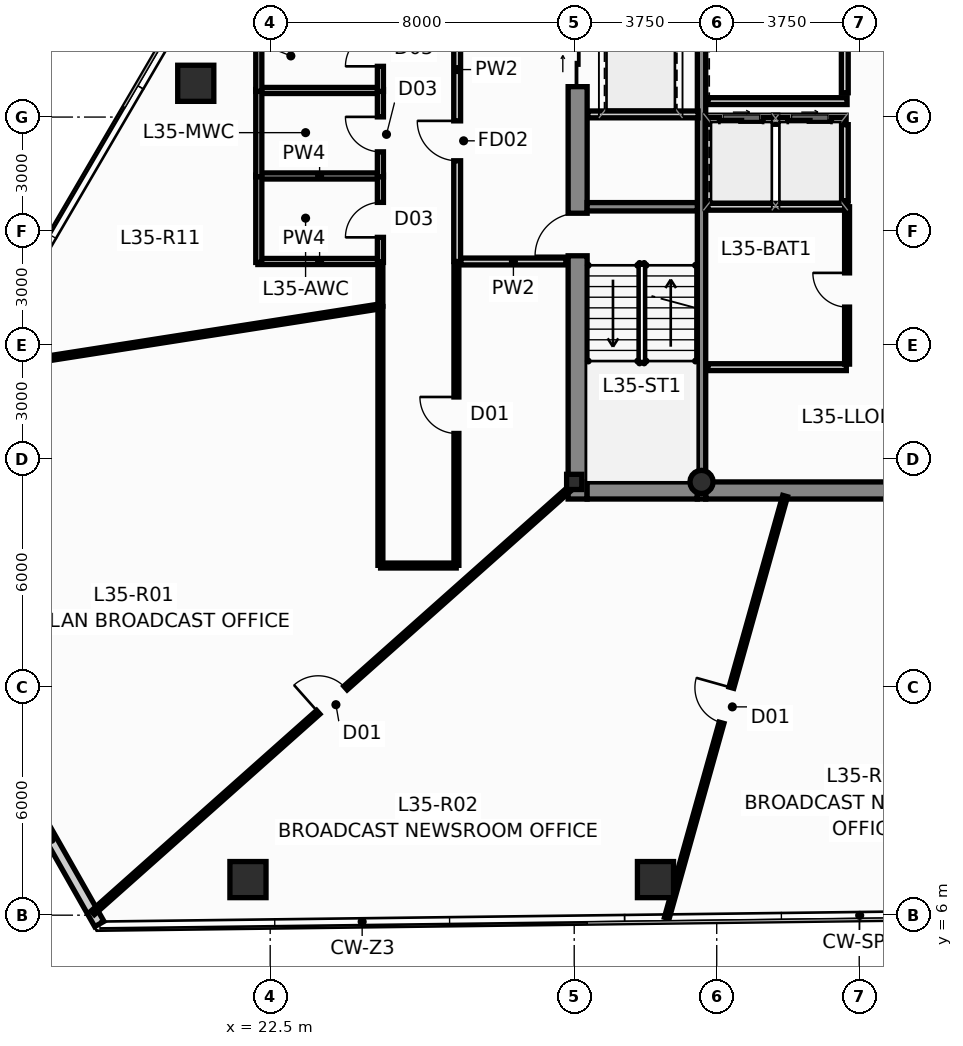
"""IFC4 building model, lengths in metres.
Left out: names, types, materials, properties, quantities, classifications, styles, units other than length and angle.
Written with IfcOpenShell. Run it as: python <this file> out.ifc"""

import sys

from ifc_helpers import new_model, si_unit, direction, frame, frame_2d, origin, origin_2d, place, context, subcontext, project, spatial, rectangle, hollow_rectangle, hollow_circle, i_section, extrude, source, transform, mapped, element, fill, save


model = new_model("IFC4")
c1 = context("Model", 3, precision=1e-05, world=origin(), true_north=direction((0.0, 1.0)))
c2 = subcontext(c1, "Body", "Model", "MODEL_VIEW")
j1 = project(units=[si_unit("LENGTHUNIT", "METRE"), si_unit("PLANEANGLEUNIT", "RADIAN")], contexts=[c1])
p1 = place(None, origin())
s1 = spatial("IfcSite", under=j1, at=p1, CompositionType="ELEMENT")
p2 = place(p1, origin())
s2 = spatial("IfcBuilding", under=s1, at=p2, CompositionType="ELEMENT")
p3 = place(p2, frame((0.0, 0.0, 135.45)))
s3 = spatial("IfcBuildingStorey", under=s2, at=p3, CompositionType="ELEMENT", Elevation=135.45)
m1 = source(origin(), c2, "Body", "SweptSolid", [
    extrude(i_section(OverallWidth=0.4, OverallDepth=0.4, WebThickness=0.02, FlangeThickness=0.032, at=origin_2d()), origin(), (0.0, 0.0, 1.0), 3.65),
])
p4 = place(p3, frame((30.5, 17.4, 0.0), z_axis=(0.0, 0.0, 1.0), x_axis=(1.0, 0.0, 0.0)))
e1 = element("IfcColumn", 1, at=p4, inside=s3, PredefinedType="COLUMN", context=c2, shape_type="MappedRepresentation", body=[
    mapped(m1, transform((0.0, 0.0, 0.0), scale=1.0)),
])
m2 = source(origin(), c2, "Body", "SweptSolid", [
    extrude(hollow_circle(Radius=0.305, WallThickness=0.025, at=origin_2d()), origin(), (0.0, 0.0, 1.0), 3.65),
])
p5 = place(p3, frame((33.85, 17.4, 0.0), z_axis=(0.0, 0.0, 1.0), x_axis=(1.0, 0.0, 0.0)))
e2 = element("IfcColumn", 2, at=p5, inside=s3, PredefinedType="COLUMN", context=c2, shape_type="MappedRepresentation", body=[
    mapped(m2, transform((0.0, 0.0, 0.0), scale=1.0)),
])
p6 = place(p3, frame((30.59, 16.95, 0.0), z_axis=(0.0, 0.0, 1.0), x_axis=(0.0, 1.0, 0.0)))
e3 = element("IfcWall", 3, at=p6, inside=s3, PredefinedType="SHEAR", context=c2, shape_type="SweptSolid", body=[
    extrude(rectangle(XDim=13.275, YDim=0.5, at=frame_2d((6.638, 0.0))), origin(), (0.0, 0.0, 1.0), 3.65),
])
p7 = place(p6, frame((6.4, 0.0, 0.0)))
e4 = element("IfcOpeningElement", 4, at=p7, cuts=e3, PredefinedType="OPENING", context=c2, shape_type="SweptSolid", body=[
    extrude(rectangle(XDim=1.12, YDim=2.15, at=frame_2d((0.56, 1.075))), frame((0.0, 0.262, 0.0), z_axis=(0.0, -1.0, 0.0), x_axis=(1.0, 0.0, 0.0)), (0.0, 0.0, 1.0), 0.524),
])
p8 = place(p6, frame((10.85, 0.0, 0.0)))
e5 = element("IfcOpeningElement", 5, at=p8, cuts=e3, PredefinedType="OPENING", context=c2, shape_type="SweptSolid", body=[
    extrude(rectangle(XDim=1.2, YDim=2.2, at=frame_2d((0.6, 1.1))), frame((0.0, 0.262, 0.0), z_axis=(0.0, -1.0, 0.0), x_axis=(1.0, 0.0, 0.0)), (0.0, 0.0, 1.0), 0.524),
])
p9 = place(p3, frame((30.84, 17.175, 0.0), z_axis=(0.0, 0.0, 1.0), x_axis=(1.0, 0.0, 0.0)))
e6 = element("IfcWall", 6, at=p9, inside=s3, PredefinedType="SHEAR", context=c2, shape_type="SweptSolid", body=[
    extrude(rectangle(XDim=2.9, YDim=0.45, at=frame_2d((1.45, 0.0))), origin(), (0.0, 0.0, 1.0), 3.65),
])
p10 = place(p3, frame((33.96, 17.175, 0.0), z_axis=(0.0, 0.0, 1.0), x_axis=(1.0, 0.0, 0.0)))
e7 = element("IfcWall", 7, at=p10, inside=s3, PredefinedType="SHEAR", context=c2, shape_type="SweptSolid", body=[
    extrude(rectangle(XDim=8.08, YDim=0.45, at=frame_2d((4.04, 0.0))), origin(), (0.0, 0.0, 1.0), 3.65),
])
p11 = place(p3, frame((33.85, 16.95, 0.0), z_axis=(0.0, 0.0, 1.0), x_axis=(0.0, 1.0, 0.0)))
e8 = element("IfcWall", 8, at=p11, inside=s3, PredefinedType="SHEAR", context=c2, shape_type="SweptSolid", body=[
    extrude(rectangle(XDim=13.275, YDim=0.22, at=frame_2d((6.638, 0.0))), origin(), (0.0, 0.0, 1.0), 3.65),
])
p12 = place(p3, frame((30.84, 24.64, 0.0), z_axis=(0.0, 0.0, 1.0), x_axis=(1.0, 0.0, 0.0)))
e9 = element("IfcWall", 9, at=p12, inside=s3, PredefinedType="SHEAR", context=c2, shape_type="SweptSolid", body=[
    extrude(rectangle(XDim=2.9, YDim=0.22, at=frame_2d((1.45, 0.0))), origin(), (0.0, 0.0, 1.0), 3.65),
])
m3 = source(origin(), c2, "Body", "SweptSolid", [
    extrude(hollow_rectangle(XDim=0.95, YDim=0.95, WallThickness=0.05, at=origin_2d()), origin(), (0.0, 0.0, 1.0), 3.651),
])
p13 = place(p3, frame((20.542, 27.889, 0.0), z_axis=(0.014912302561, -0.01384236157, 0.999792984702), x_axis=(0.680325028146, 0.732910537568, 0.0)))
e10 = element("IfcColumn", 10, at=p13, inside=s3, PredefinedType="COLUMN", context=c2, shape_type="MappedRepresentation", body=[
    mapped(m3, transform((0.0, 0.0, 0.0), scale=1.0)),
])
m4 = source(origin(), c2, "Body", "SweptSolid", [
    extrude(hollow_rectangle(XDim=0.95, YDim=0.95, WallThickness=0.05, at=origin_2d()), origin(), (0.0, 0.0, 1.0), 3.651),
])
p14 = place(p3, frame((21.915, 6.936, 0.0), z_axis=(-0.013440068782, 0.019792340097, 0.999713772949), x_axis=(-0.827290216258, -0.561774775229, 0.0)))
e11 = element("IfcColumn", 11, at=p14, inside=s3, PredefinedType="COLUMN", context=c2, shape_type="MappedRepresentation", body=[
    mapped(m4, transform((0.0, 0.0, 0.0), scale=1.0)),
])
p15 = place(p3, frame((32.638, 6.936, 0.0), z_axis=(-0.004480382638, 0.019793929266, 0.999794042058), x_axis=(-0.975326687046, -0.220766513622, 0.0)))
e12 = element("IfcColumn", 12, at=p15, inside=s3, PredefinedType="COLUMN", context=c2, shape_type="MappedRepresentation", body=[
    mapped(m3, transform((0.0, 0.0, 0.0), scale=1.0)),
])
p16 = place(p3, frame((18.004, 5.768, 0.0), z_axis=(0.0, 0.0, 1.0), x_axis=(-0.493589358445, 0.869695087505, 0.0)))
e13 = element("IfcWall", 13, at=p16, inside=s3, PredefinedType="STANDARD", context=c2, shape_type="SweptSolid", body=[
    extrude(rectangle(XDim=11.735, YDim=0.28, at=frame_2d((5.867, 0.0))), origin(), (0.0, 0.0, 1.0), 3.4),
])
p17 = place(p16, frame((5.12, 0.0, 0.9)))
e14 = element("IfcOpeningElement", 14, at=p17, cuts=e13, PredefinedType="OPENING", context=c2, shape_type="SweptSolid", body=[
    extrude(rectangle(XDim=1.5, YDim=1.8, at=frame_2d((0.75, 0.9))), frame((0.0, 0.152, 0.0), z_axis=(0.0, -1.0, 0.0), x_axis=(1.0, 0.0, 0.0)), (0.0, 0.0, 1.0), 0.304),
])
p18 = place(p3, frame((34.02, 26.9, 0.0), z_axis=(0.0, 0.0, 1.0), x_axis=(1.0, 0.0, 0.0)))
e15 = element("IfcWall", 15, at=p18, inside=s3, PredefinedType="PARTITIONING", context=c2, shape_type="SweptSolid", body=[
    extrude(rectangle(XDim=3.6, YDim=0.18, at=frame_2d((1.8, 0.0))), origin(), (0.0, 0.0, 1.0), 3.4),
])
p19 = place(p18, frame((0.3, 0.0, 0.0)))
e16 = element("IfcOpeningElement", 16, at=p19, cuts=e15, PredefinedType="OPENING", context=c2, shape_type="SweptSolid", body=[
    extrude(rectangle(XDim=1.15, YDim=2.2, at=frame_2d((0.575, 1.1))), frame((0.0, 0.102, 0.0), z_axis=(0.0, -1.0, 0.0), x_axis=(1.0, 0.0, 0.0)), (0.0, 0.0, 1.0), 0.204),
])
p20 = place(p18, frame((2.1, 0.0, 0.0)))
e17 = element("IfcOpeningElement", 17, at=p20, cuts=e15, PredefinedType="OPENING", context=c2, shape_type="SweptSolid", body=[
    extrude(rectangle(XDim=1.15, YDim=2.2, at=frame_2d((0.575, 1.1))), frame((0.0, 0.102, 0.0), z_axis=(0.0, -1.0, 0.0), x_axis=(1.0, 0.0, 0.0)), (0.0, 0.0, 1.0), 0.204),
])
p21 = place(p3, frame((37.62, 24.8, 0.0), z_axis=(0.0, 0.0, 1.0), x_axis=(0.0, 1.0, 0.0)))
e18 = element("IfcWall", 18, at=p21, inside=s3, PredefinedType="PARTITIONING", context=c2, shape_type="SweptSolid", body=[
    extrude(rectangle(XDim=2.0, YDim=0.18, at=frame_2d((1.0, 0.0))), origin(), (0.0, 0.0, 1.0), 3.4),
])
p22 = place(p3, frame((34.02, 24.64, 0.0), z_axis=(0.0, 0.0, 1.0), x_axis=(1.0, 0.0, 0.0)))
e19 = element("IfcWall", 19, at=p22, inside=s3, PredefinedType="PARTITIONING", context=c2, shape_type="SweptSolid", body=[
    extrude(rectangle(XDim=3.68, YDim=0.18, at=frame_2d((1.84, 0.0))), origin(), (0.0, 0.0, 1.0), 3.4),
])
p23 = place(p3, frame((34.02, 27.42, 0.0), z_axis=(0.0, 0.0, 1.0), x_axis=(1.0, 0.0, 0.0)))
e20 = element("IfcWall", 20, at=p23, inside=s3, PredefinedType="PARTITIONING", context=c2, shape_type="SweptSolid", body=[
    extrude(rectangle(XDim=3.66, YDim=0.18, at=frame_2d((1.83, 0.0))), origin(), (0.0, 0.0, 1.0), 3.4),
])
p24 = place(p3, frame((37.62, 27.64, 0.0), z_axis=(0.0, 0.0, 1.0), x_axis=(0.0, 1.0, 0.0)))
e21 = element("IfcWall", 21, at=p24, inside=s3, PredefinedType="PARTITIONING", context=c2, shape_type="SweptSolid", body=[
    extrude(rectangle(XDim=2.11, YDim=0.18, at=frame_2d((1.055, 0.0))), origin(), (0.0, 0.0, 1.0), 3.4),
])
p25 = place(p3, frame((27.42, 23.2, 0.0), z_axis=(0.0, 0.0, 1.0), x_axis=(0.0, 1.0, 0.0)))
e22 = element("IfcWall", 22, at=p25, inside=s3, PredefinedType="PARTITIONING", context=c2, shape_type="SweptSolid", body=[
    extrude(rectangle(XDim=6.4, YDim=0.18, at=frame_2d((3.2, 0.0))), origin(), (0.0, 0.0, 1.0), 3.078),
])
p26 = place(p25, frame((2.65, 0.0, 0.0)))
e23 = element("IfcOpeningElement", 23, at=p26, cuts=e22, PredefinedType="OPENING", context=c2, shape_type="SweptSolid", body=[
    extrude(rectangle(XDim=1.05, YDim=2.15, at=frame_2d((0.525, 1.075))), frame((0.0, 0.102, 0.0), z_axis=(0.0, -1.0, 0.0), x_axis=(1.0, 0.0, 0.0)), (0.0, 0.0, 1.0), 0.204),
])
p27 = place(p3, frame((27.52, 23.2, 0.0), z_axis=(0.0, 0.0, 1.0), x_axis=(1.0, 0.0, 0.0)))
e24 = element("IfcWall", 24, at=p27, inside=s3, PredefinedType="PARTITIONING", context=c2, shape_type="SweptSolid", body=[
    extrude(rectangle(XDim=2.76, YDim=0.18, at=frame_2d((1.38, 0.0))), origin(), (0.0, 0.0, 1.0), 3.4),
])
p28 = place(p3, frame((30.86, 27.07, 0.0), z_axis=(0.0, 0.0, 1.0), x_axis=(1.0, 0.0, 0.0)))
e25 = element("IfcWall", 25, at=p28, inside=s3, PredefinedType="PARTITIONING", context=c2, shape_type="SweptSolid", body=[
    extrude(rectangle(XDim=2.9, YDim=0.18, at=frame_2d((1.45, 0.0))), origin(), (0.0, 0.0, 1.0), 3.4),
])
p29 = place(p3, frame((34.02, 20.42, 0.0), z_axis=(0.0, 0.0, 1.0), x_axis=(1.0, 0.0, 0.0)))
e26 = element("IfcWall", 26, at=p29, inside=s3, PredefinedType="PARTITIONING", context=c2, shape_type="SweptSolid", body=[
    extrude(rectangle(XDim=3.64, YDim=0.18, at=frame_2d((1.82, 0.0))), origin(), (0.0, 0.0, 1.0), 3.4),
])
p30 = place(p3, frame((37.68, 20.5, 0.0), z_axis=(0.0, 0.0, 1.0), x_axis=(0.0, 1.0, 0.0)))
e27 = element("IfcWall", 27, at=p30, inside=s3, PredefinedType="PARTITIONING", context=c2, shape_type="SweptSolid", body=[
    extrude(rectangle(XDim=4.14, YDim=0.13, at=frame_2d((2.07, 0.0))), origin(), (0.0, 0.0, 1.0), 3.4),
])
p31 = place(p30, frame((1.5, 0.0, 0.0)))
e28 = element("IfcOpeningElement", 28, at=p31, cuts=e27, PredefinedType="OPENING", context=c2, shape_type="SweptSolid", body=[
    extrude(rectangle(XDim=0.9, YDim=2.1, at=frame_2d((0.45, 1.05))), frame((0.0, 0.077, 0.0), z_axis=(0.0, -1.0, 0.0), x_axis=(1.0, 0.0, 0.0)), (0.0, 0.0, 1.0), 0.154),
])
for number, where, z_axis, x_axis in (
    (29, (22.175, 23.2, 0.0), (0.0, 0.0, 1.0), (1.0, 0.0, 0.0)),
    (30, (22.175, 25.45, 0.0), (0.0, 0.0, 1.0), (1.0, 0.0, 0.0)),
):
    element("IfcWall", number, at=place(p3, frame(where, z_axis=z_axis, x_axis=x_axis)), inside=s3, PredefinedType="PLUMBINGWALL", context=c2, shape_type="SweptSolid", body=[
        extrude(rectangle(XDim=3.25, YDim=0.16, at=frame_2d((1.625, 0.0))), origin(), (0.0, 0.0, 1.0), 3.4),
    ])
p32 = place(p3, frame((22.175, 27.7, 0.0), z_axis=(0.0, 0.0, 1.0), x_axis=(1.0, 0.0, 0.0)))
e31 = element("IfcWall", 31, at=p32, inside=s3, PredefinedType="PLUMBINGWALL", context=c2, shape_type="SweptSolid", body=[
    extrude(rectangle(XDim=3.25, YDim=0.16, at=frame_2d((1.625, 0.0))), origin(), (0.0, 0.0, 1.0), 2.925),
])
p33 = place(p3, frame((25.4, 23.175, 0.0), z_axis=(0.0, 0.0, 1.0), x_axis=(0.0, 1.0, 0.0)))
e32 = element("IfcWall", 32, at=p33, inside=s3, PredefinedType="PLUMBINGWALL", context=c2, shape_type="SweptSolid", body=[
    extrude(rectangle(XDim=2.3, YDim=0.16, at=frame_2d((1.15, 0.0))), origin(), (0.0, 0.0, 1.0), 3.4),
])
p34 = place(p33, frame((0.66, 0.0, 0.0)))
e33 = element("IfcOpeningElement", 33, at=p34, cuts=e32, PredefinedType="OPENING", context=c2, shape_type="SweptSolid", body=[
    extrude(rectangle(XDim=0.92, YDim=2.1, at=frame_2d((0.46, 1.05))), frame((0.0, 0.092, 0.0), z_axis=(0.0, -1.0, 0.0), x_axis=(1.0, 0.0, 0.0)), (0.0, 0.0, 1.0), 0.184),
])
p35 = place(p3, frame((25.4, 25.425, 0.0), z_axis=(0.0, 0.0, 1.0), x_axis=(0.0, 1.0, 0.0)))
e34 = element("IfcWall", 34, at=p35, inside=s3, PredefinedType="PLUMBINGWALL", context=c2, shape_type="SweptSolid", body=[
    extrude(rectangle(XDim=2.3, YDim=0.16, at=frame_2d((1.15, 0.0))), origin(), (0.0, 0.0, 1.0), 3.078),
])
p36 = place(p35, frame((0.66, 0.0, 0.0)))
e35 = element("IfcOpeningElement", 35, at=p36, cuts=e34, PredefinedType="OPENING", context=c2, shape_type="SweptSolid", body=[
    extrude(rectangle(XDim=0.92, YDim=2.1, at=frame_2d((0.46, 1.05))), frame((0.0, 0.092, 0.0), z_axis=(0.0, -1.0, 0.0), x_axis=(1.0, 0.0, 0.0)), (0.0, 0.0, 1.0), 0.184),
])
p37 = place(p3, frame((25.4, 27.675, 0.0), z_axis=(0.0, 0.0, 1.0), x_axis=(0.0, 1.0, 0.0)))
e36 = element("IfcWall", 36, at=p37, inside=s3, PredefinedType="PLUMBINGWALL", context=c2, shape_type="SweptSolid", body=[
    extrude(rectangle(XDim=2.3, YDim=0.16, at=frame_2d((1.15, 0.0))), origin(), (0.0, 0.0, 1.0), 3.078),
])
p38 = place(p37, frame((0.66, 0.0, 0.0)))
e37 = element("IfcOpeningElement", 37, at=p38, cuts=e36, PredefinedType="OPENING", context=c2, shape_type="SweptSolid", body=[
    extrude(rectangle(XDim=0.92, YDim=2.1, at=frame_2d((0.46, 1.05))), frame((0.0, 0.092, 0.0), z_axis=(0.0, -1.0, 0.0), x_axis=(1.0, 0.0, 0.0)), (0.0, 0.0, 1.0), 0.184),
])
p39 = place(p3, frame((22.2, 25.475, 0.0), z_axis=(0.0, 0.0, 1.0), x_axis=(0.0, -1.0, 0.0)))
e38 = element("IfcWall", 38, at=p39, inside=s3, PredefinedType="PLUMBINGWALL", context=c2, shape_type="SweptSolid", body=[
    extrude(rectangle(XDim=2.3, YDim=0.16, at=frame_2d((1.15, 0.0))), origin(), (0.0, 0.0, 1.0), 3.078),
])
for number, where, z_axis, x_axis in (
    (39, (22.2, 25.425, 0.0), (0.0, 0.0, 1.0), (0.0, 1.0, 0.0)),
    (40, (22.2, 27.675, 0.0), (0.0, 0.0, 1.0), (0.0, 1.0, 0.0)),
):
    element("IfcWall", number, at=place(p3, frame(where, z_axis=z_axis, x_axis=x_axis)), inside=s3, PredefinedType="PLUMBINGWALL", context=c2, shape_type="SweptSolid", body=[
        extrude(rectangle(XDim=2.3, YDim=0.16, at=frame_2d((1.15, 0.0))), origin(), (0.0, 0.0, 1.0), 3.4),
    ])
p40 = place(p3, frame((17.831, 6.063, 0.0), z_axis=(0.0, 0.0, 1.0), x_axis=(0.747287034521, 0.664501383021, 0.0)))
e41 = element("IfcWall", 41, at=p40, inside=s3, PredefinedType="PARTITIONING", context=c2, shape_type="SweptSolid", body=[
    extrude(rectangle(XDim=16.745, YDim=0.13, at=frame_2d((8.373, 0.0))), origin(), (0.0, 0.0, 1.0), 2.925),
])
p41 = place(p40, frame((7.94, 0.0, 0.0)))
e42 = element("IfcOpeningElement", 42, at=p41, cuts=e41, PredefinedType="OPENING", context=c2, shape_type="SweptSolid", body=[
    extrude(rectangle(XDim=0.96, YDim=2.15, at=frame_2d((0.48, 1.075))), frame((0.0, 0.077, 0.0), z_axis=(0.0, -1.0, 0.0), x_axis=(1.0, 0.0, 0.0)), (0.0, 0.0, 1.0), 0.154),
])
p42 = place(p3, frame((32.937, 5.925, 0.0), z_axis=(0.0, 0.0, 1.0), x_axis=(0.270006068568, 0.96285862043, 0.0)))
e43 = element("IfcWall", 43, at=p42, inside=s3, PredefinedType="PARTITIONING", context=c2, shape_type="SweptSolid", body=[
    extrude(rectangle(XDim=11.531, YDim=0.13, at=frame_2d((5.766, 0.0))), origin(), (0.0, 0.0, 1.0), 3.4),
])
p43 = place(p42, frame((5.335, 0.0, 0.0)))
e44 = element("IfcOpeningElement", 44, at=p43, cuts=e43, PredefinedType="OPENING", context=c2, shape_type="SweptSolid", body=[
    extrude(rectangle(XDim=0.96, YDim=2.15, at=frame_2d((0.48, 1.075))), frame((0.0, 0.077, 0.0), z_axis=(0.0, -1.0, 0.0), x_axis=(1.0, 0.0, 0.0)), (0.0, 0.0, 1.0), 0.154),
])
p44 = place(p3, frame((14.733, 20.349, 0.0), z_axis=(0.0, 0.0, 1.0), x_axis=(0.987959356418, 0.154713638912, 0.0)))
e45 = element("IfcWall", 45, at=p44, inside=s3, PredefinedType="PARTITIONING", context=c2, shape_type="SweptSolid", body=[
    extrude(rectangle(XDim=10.792, YDim=0.13, at=frame_2d((5.396, 0.0))), origin(), (0.0, 0.0, 1.0), 3.4),
])
p45 = place(p3, frame((27.4, 15.205, 0.0), z_axis=(0.0, 0.0, 1.0), x_axis=(0.0, 1.0, 0.0)))
e46 = element("IfcWall", 46, at=p45, inside=s3, PredefinedType="PARTITIONING", context=c2, shape_type="SweptSolid", body=[
    extrude(rectangle(XDim=7.9, YDim=0.13, at=frame_2d((3.95, 0.0))), origin(), (0.0, 0.0, 1.0), 3.4),
])
p46 = place(p45, frame((3.47, 0.0, 0.0)))
e47 = element("IfcOpeningElement", 47, at=p46, cuts=e46, PredefinedType="OPENING", context=c2, shape_type="SweptSolid", body=[
    extrude(rectangle(XDim=0.96, YDim=2.15, at=frame_2d((0.48, 1.075))), frame((0.0, 0.077, 0.0), z_axis=(0.0, -1.0, 0.0), x_axis=(1.0, 0.0, 0.0)), (0.0, 0.0, 1.0), 0.154),
])
p47 = place(p3, frame((25.4, 22.015, 0.0), z_axis=(0.0, 0.0, 1.0), x_axis=(0.0, -1.0, 0.0)))
e48 = element("IfcWall", 48, at=p47, inside=s3, PredefinedType="PARTITIONING", context=c2, shape_type="SweptSolid", body=[
    extrude(rectangle(XDim=6.81, YDim=0.13, at=frame_2d((3.405, 0.0))), origin(), (0.0, 0.0, 1.0), 3.078),
])
p48 = place(p3, frame((25.405, 15.2, 0.0), z_axis=(0.0, 0.0, 1.0), x_axis=(1.0, 0.0, 0.0)))
e49 = element("IfcWall", 49, at=p48, inside=s3, PredefinedType="PARTITIONING", context=c2, shape_type="SweptSolid", body=[
    extrude(rectangle(XDim=1.99, YDim=0.13, at=frame_2d((0.995, 0.0))), origin(), (0.0, 0.0, 1.0), 3.4),
])
p49 = place(p3, frame((25.4, 22.025, 0.0), z_axis=(0.0, 0.0, 1.0), x_axis=(0.0, 1.0, 0.0)))
e50 = element("IfcWall", 50, at=p49, inside=s3, PredefinedType="PARTITIONING", context=c2, shape_type="SweptSolid", body=[
    extrude(rectangle(XDim=1.17, YDim=0.13, at=frame_2d((0.585, 0.0))), origin(), (0.0, 0.0, 1.0), 3.4),
])
p50 = place(p7, origin())
e51 = element("IfcDoor", 51, at=p50, inside=s3, OperationType="SINGLE_SWING_LEFT", PredefinedType="DOOR", context=c2, shape_type="SweptSolid", body=[
    extrude(rectangle(XDim=1.12, YDim=2.15, at=frame_2d((0.56, 1.075))), frame((0.0, 0.025, 0.0), z_axis=(0.0, -1.0, 0.0), x_axis=(1.0, 0.0, 0.0)), (0.0, 0.0, 1.0), 0.05),
])
fill(e4, e51)
p51 = place(p8, origin())
e52 = element("IfcDoor", 52, at=p51, inside=s3, OperationType="SLIDING_TO_LEFT", PredefinedType="DOOR", context=c2, shape_type="SweptSolid", body=[
    extrude(rectangle(XDim=1.2, YDim=2.2, at=frame_2d((0.6, 1.1))), frame((0.0, 0.025, 0.0), z_axis=(0.0, -1.0, 0.0), x_axis=(1.0, 0.0, 0.0)), (0.0, 0.0, 1.0), 0.05),
])
fill(e5, e52)
p52 = place(p19, origin())
e53 = element("IfcDoor", 53, at=p52, inside=s3, OperationType="SLIDING_TO_LEFT", PredefinedType="DOOR", context=c2, shape_type="SweptSolid", body=[
    extrude(rectangle(XDim=1.15, YDim=2.2, at=frame_2d((0.575, 1.1))), frame((0.0, 0.025, 0.0), z_axis=(0.0, -1.0, 0.0), x_axis=(1.0, 0.0, 0.0)), (0.0, 0.0, 1.0), 0.05),
])
fill(e16, e53)
p53 = place(p20, origin())
e54 = element("IfcDoor", 54, at=p53, inside=s3, OperationType="SLIDING_TO_RIGHT", PredefinedType="DOOR", context=c2, shape_type="SweptSolid", body=[
    extrude(rectangle(XDim=1.15, YDim=2.2, at=frame_2d((0.575, 1.1))), frame((0.0, 0.025, 0.0), z_axis=(0.0, -1.0, 0.0), x_axis=(1.0, 0.0, 0.0)), (0.0, 0.0, 1.0), 0.05),
])
fill(e17, e54)
p54 = place(p26, origin())
e55 = element("IfcDoor", 55, at=p54, inside=s3, OperationType="SINGLE_SWING_RIGHT", PredefinedType="DOOR", context=c2, shape_type="SweptSolid", body=[
    extrude(rectangle(XDim=1.05, YDim=2.15, at=frame_2d((0.525, 1.075))), frame((0.0, 0.025, 0.0), z_axis=(0.0, -1.0, 0.0), x_axis=(1.0, 0.0, 0.0)), (0.0, 0.0, 1.0), 0.05),
])
fill(e23, e55)
p55 = place(p31, origin())
e56 = element("IfcDoor", 56, at=p55, inside=s3, OperationType="SINGLE_SWING_RIGHT", PredefinedType="DOOR", context=c2, shape_type="SweptSolid", body=[
    extrude(rectangle(XDim=0.9, YDim=2.1, at=frame_2d((0.45, 1.05))), frame((0.0, 0.025, 0.0), z_axis=(0.0, -1.0, 0.0), x_axis=(1.0, 0.0, 0.0)), (0.0, 0.0, 1.0), 0.05),
])
fill(e28, e56)
p56 = place(p34, origin())
e57 = element("IfcDoor", 57, at=p56, inside=s3, OperationType="SINGLE_SWING_LEFT", PredefinedType="DOOR", context=c2, shape_type="SweptSolid", body=[
    extrude(rectangle(XDim=0.92, YDim=2.1, at=frame_2d((0.46, 1.05))), frame((0.0, 0.025, 0.0), z_axis=(0.0, -1.0, 0.0), x_axis=(1.0, 0.0, 0.0)), (0.0, 0.0, 1.0), 0.05),
])
fill(e33, e57)
p57 = place(p36, origin())
e58 = element("IfcDoor", 58, at=p57, inside=s3, OperationType="SINGLE_SWING_RIGHT", PredefinedType="DOOR", context=c2, shape_type="SweptSolid", body=[
    extrude(rectangle(XDim=0.92, YDim=2.1, at=frame_2d((0.46, 1.05))), frame((0.0, 0.025, 0.0), z_axis=(0.0, -1.0, 0.0), x_axis=(1.0, 0.0, 0.0)), (0.0, 0.0, 1.0), 0.05),
])
fill(e35, e58)
p58 = place(p38, origin())
e59 = element("IfcDoor", 59, at=p58, inside=s3, OperationType="SINGLE_SWING_LEFT", PredefinedType="DOOR", context=c2, shape_type="SweptSolid", body=[
    extrude(rectangle(XDim=0.92, YDim=2.1, at=frame_2d((0.46, 1.05))), frame((0.0, 0.025, 0.0), z_axis=(0.0, -1.0, 0.0), x_axis=(1.0, 0.0, 0.0)), (0.0, 0.0, 1.0), 0.05),
])
fill(e37, e59)
p59 = place(p41, origin())
e60 = element("IfcDoor", 60, at=p59, inside=s3, OperationType="SINGLE_SWING_LEFT", PredefinedType="DOOR", context=c2, shape_type="SweptSolid", body=[
    extrude(rectangle(XDim=0.96, YDim=2.15, at=frame_2d((0.48, 1.075))), frame((0.0, 0.025, 0.0), z_axis=(0.0, -1.0, 0.0), x_axis=(1.0, 0.0, 0.0)), (0.0, 0.0, 1.0), 0.05),
])
fill(e42, e60)
p60 = place(p43, origin())
e61 = element("IfcDoor", 61, at=p60, inside=s3, OperationType="SINGLE_SWING_RIGHT", PredefinedType="DOOR", context=c2, shape_type="SweptSolid", body=[
    extrude(rectangle(XDim=0.96, YDim=2.15, at=frame_2d((0.48, 1.075))), frame((0.0, 0.025, 0.0), z_axis=(0.0, -1.0, 0.0), x_axis=(1.0, 0.0, 0.0)), (0.0, 0.0, 1.0), 0.05),
])
fill(e44, e61)
p61 = place(p46, origin())
e62 = element("IfcDoor", 62, at=p61, inside=s3, OperationType="SINGLE_SWING_RIGHT", PredefinedType="DOOR", context=c2, shape_type="SweptSolid", body=[
    extrude(rectangle(XDim=0.96, YDim=2.15, at=frame_2d((0.48, 1.075))), frame((0.0, 0.025, 0.0), z_axis=(0.0, -1.0, 0.0), x_axis=(1.0, 0.0, 0.0)), (0.0, 0.0, 1.0), 0.05),
])
fill(e47, e62)
save(model, sys.argv[1])
